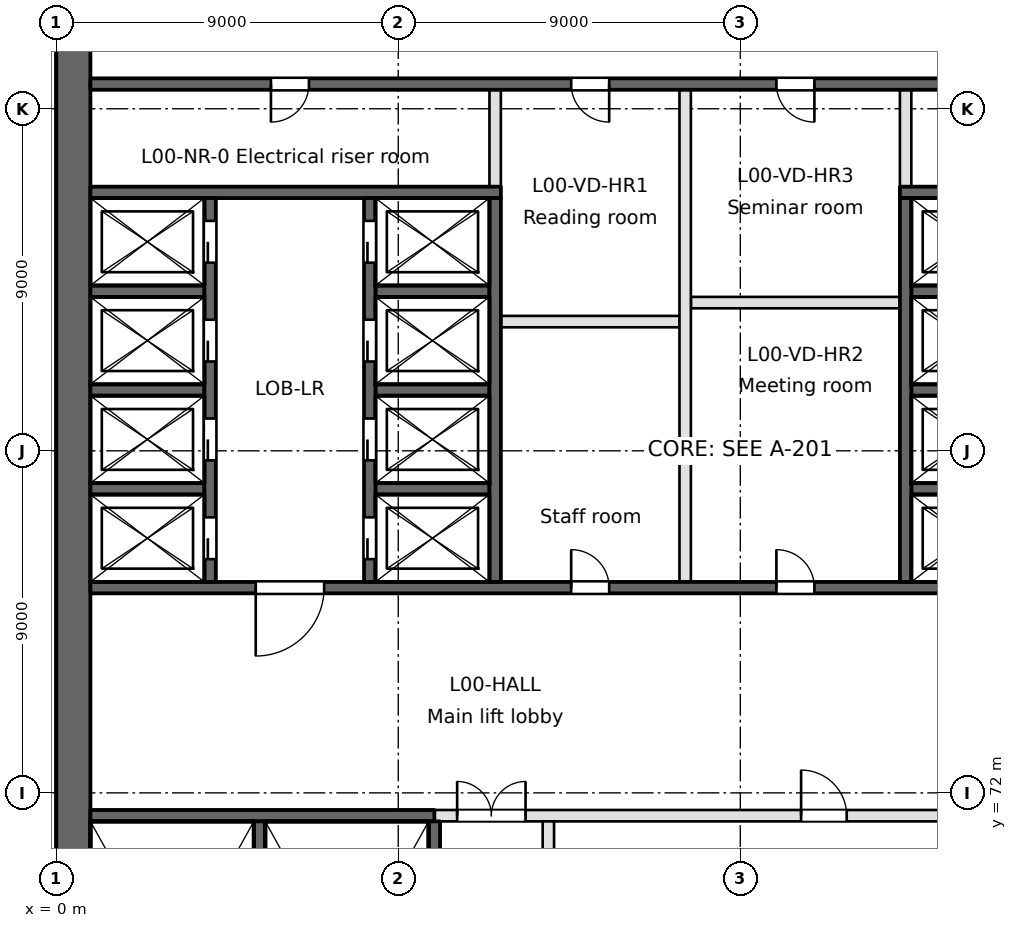
"""IFC4 building model, lengths in metres.
Left out: names, types, materials, properties, quantities, classifications, styles, units other than length and angle.
Written with IfcOpenShell. Run it as: python <this file> out.ifc"""

import sys

from ifc_helpers import new_model, si_unit, direction, frame, frame_2d, origin, place, context, subcontext, project, spatial, rectangle, extrude, element, fill, save


model = new_model("IFC4")
c1 = context("Model", 3, precision=1e-05, world=origin(), true_north=direction((0.0, 1.0)))
c2 = subcontext(c1, "Body", "Model", "MODEL_VIEW")
j1 = project(units=[si_unit("LENGTHUNIT", "METRE"), si_unit("PLANEANGLEUNIT", "RADIAN")], contexts=[c1])
p1 = place(None, origin())
s1 = spatial("IfcSite", under=j1, at=p1, CompositionType="ELEMENT")
p2 = place(p1, origin())
s2 = spatial("IfcBuilding", under=s1, at=p2, CompositionType="ELEMENT")
p3 = place(p2, origin())
s3 = spatial("IfcBuildingStorey", under=s2, at=p3, CompositionType="ELEMENT", Elevation=0.0)
p4 = place(p3, frame((0.45, 94.5, 0.0), z_axis=(0.0, 0.0, 1.0), x_axis=(0.0, -1.0, 0.0)))
e1 = element("IfcWall", 1, at=p4, inside=s3, PredefinedType="SHEAR", context=c2, shape_type="SweptSolid", body=[
    extrude(rectangle(XDim=66.085, YDim=0.9, at=frame_2d((33.042, 0.0))), origin(), (0.0, 0.0, 1.0), 6.0),
])
p5 = place(p4, frame((50.025, 0.0, 0.0)))
e2 = element("IfcOpeningElement", 2, at=p5, cuts=e1, PredefinedType="OPENING", context=c2, shape_type="SweptSolid", body=[
    extrude(rectangle(XDim=1.2, YDim=2.1, at=frame_2d((0.6, 1.05))), frame((0.0, 0.45, 0.0), z_axis=(0.0, -1.0, 0.0), x_axis=(1.0, 0.0, 0.0)), (0.0, 0.0, 1.0), 0.9),
])
p6 = place(p3, frame((0.9, 71.4, -0.4), z_axis=(0.0, 0.0, 1.0), x_axis=(1.0, 0.0, 0.0)))
e3 = element("IfcWall", 3, at=p6, inside=s3, PredefinedType="SOLIDWALL", context=c2, shape_type="SweptSolid", body=[
    extrude(rectangle(XDim=9.05, YDim=0.3, at=frame_2d((4.525, 0.0))), origin(), (0.0, 0.0, 1.0), 6.05),
])
p7 = place(p3, frame((9.95, 71.4, 0.0), z_axis=(0.0, 0.0, 1.0), x_axis=(1.0, 0.0, 0.0)))
e4 = element("IfcWall", 4, at=p7, inside=s3, PredefinedType="PARTITIONING", context=c2, shape_type="SweptSolid", body=[
    extrude(rectangle(XDim=17.65, YDim=0.3, at=frame_2d((8.825, 0.0))), origin(), (0.0, 0.0, 1.0), 5.65),
])
p8 = place(p7, frame((0.6, 0.0, 0.0)))
e5 = element("IfcOpeningElement", 5, at=p8, cuts=e4, PredefinedType="OPENING", context=c2, shape_type="SweptSolid", body=[
    extrude(rectangle(XDim=1.8, YDim=2.1, at=frame_2d((0.9, 1.05))), frame((0.0, 0.15, 0.0), z_axis=(0.0, -1.0, 0.0), x_axis=(1.0, 0.0, 0.0)), (0.0, 0.0, 1.0), 0.3),
])
p9 = place(p7, frame((9.65, 0.0, 0.0)))
e6 = element("IfcOpeningElement", 6, at=p9, cuts=e4, PredefinedType="OPENING", context=c2, shape_type="SweptSolid", body=[
    extrude(rectangle(XDim=1.2, YDim=2.1, at=frame_2d((0.6, 1.05))), frame((0.0, 0.15, 0.0), z_axis=(0.0, -1.0, 0.0), x_axis=(1.0, 0.0, 0.0)), (0.0, 0.0, 1.0), 0.3),
])
p10 = place(p3, frame((0.9, 77.4, -0.4), z_axis=(0.0, 0.0, 1.0), x_axis=(1.0, 0.0, 0.0)))
e7 = element("IfcWall", 7, at=p10, inside=s3, PredefinedType="SOLIDWALL", context=c2, shape_type="SweptSolid", body=[
    extrude(rectangle(XDim=28.95, YDim=0.3, at=frame_2d((14.475, 0.0))), origin(), (0.0, 0.0, 1.0), 6.05),
])
p11 = place(p10, frame((4.35, 0.0, 0.4)))
e8 = element("IfcOpeningElement", 8, at=p11, cuts=e7, PredefinedType="OPENING", context=c2, shape_type="SweptSolid", body=[
    extrude(rectangle(XDim=1.8, YDim=2.1, at=frame_2d((0.9, 1.05))), frame((0.0, 0.15, 0.0), z_axis=(0.0, -1.0, 0.0), x_axis=(1.0, 0.0, 0.0)), (0.0, 0.0, 1.0), 0.3),
])
p12 = place(p10, frame((25.95, 0.0, 0.4)))
e9 = element("IfcOpeningElement", 9, at=p12, cuts=e7, PredefinedType="OPENING", context=c2, shape_type="SweptSolid", body=[
    extrude(rectangle(XDim=1.8, YDim=2.1, at=frame_2d((0.9, 1.05))), frame((0.0, 0.15, 0.0), z_axis=(0.0, -1.0, 0.0), x_axis=(1.0, 0.0, 0.0)), (0.0, 0.0, 1.0), 0.3),
])
p13 = place(p10, frame((12.65, 0.0, 0.4)))
e10 = element("IfcOpeningElement", 10, at=p13, cuts=e7, PredefinedType="OPENING", context=c2, shape_type="SweptSolid", body=[
    extrude(rectangle(XDim=1.0, YDim=2.1, at=frame_2d((0.5, 1.05))), frame((0.0, 0.15, 0.0), z_axis=(0.0, -1.0, 0.0), x_axis=(1.0, 0.0, 0.0)), (0.0, 0.0, 1.0), 0.3),
])
p14 = place(p10, frame((18.05, 0.0, 0.4)))
e11 = element("IfcOpeningElement", 11, at=p14, cuts=e7, PredefinedType="OPENING", context=c2, shape_type="SweptSolid", body=[
    extrude(rectangle(XDim=1.0, YDim=2.1, at=frame_2d((0.5, 1.05))), frame((0.0, 0.15, 0.0), z_axis=(0.0, -1.0, 0.0), x_axis=(1.0, 0.0, 0.0)), (0.0, 0.0, 1.0), 0.3),
])
for number, where, z_axis, x_axis in (
    (12, (0.9, 80.0, -0.4), (0.0, 0.0, 1.0), (1.0, 0.0, 0.0)),
    (13, (8.4, 80.0, -0.4), (0.0, 0.0, 1.0), (1.0, 0.0, 0.0)),
    (14, (22.5, 80.0, -0.4), (0.0, 0.0, 1.0), (1.0, 0.0, 0.0)),
    (15, (0.9, 82.6, -0.4), (0.0, 0.0, 1.0), (1.0, 0.0, 0.0)),
    (16, (8.4, 82.6, -0.4), (0.0, 0.0, 1.0), (1.0, 0.0, 0.0)),
    (17, (22.5, 82.6, -0.4), (0.0, 0.0, 1.0), (1.0, 0.0, 0.0)),
):
    element("IfcWall", number, at=place(p3, frame(where, z_axis=z_axis, x_axis=x_axis)), inside=s3, PredefinedType="SOLIDWALL", context=c2, shape_type="SweptSolid", body=[
        extrude(rectangle(XDim=3.0, YDim=0.3, at=frame_2d((1.5, 0.0))), origin(), (0.0, 0.0, 1.0), 6.05),
    ])
p15 = place(p3, frame((11.7, 84.4, 0.0), z_axis=(0.0, 0.0, 1.0), x_axis=(1.0, 0.0, 0.0)))
e18 = element("IfcWall", 18, at=p15, inside=s3, PredefinedType="PARTITIONING", context=c2, shape_type="SweptSolid", body=[
    extrude(rectangle(XDim=4.7, YDim=0.3, at=frame_2d((2.35, 0.0))), origin(), (0.0, 0.0, 1.0), 5.65),
])
p16 = place(p3, frame((16.7, 84.9, 0.0), z_axis=(0.0, 0.0, 1.0), x_axis=(1.0, 0.0, 0.0)))
e19 = element("IfcWall", 19, at=p16, inside=s3, PredefinedType="PARTITIONING", context=c2, shape_type="SweptSolid", body=[
    extrude(rectangle(XDim=5.5, YDim=0.3, at=frame_2d((2.75, 0.0))), origin(), (0.0, 0.0, 1.0), 5.65),
])
for number, where, z_axis, x_axis in (
    (20, (0.9, 85.2, -0.4), (0.0, 0.0, 1.0), (1.0, 0.0, 0.0)),
    (21, (8.4, 85.2, -0.4), (0.0, 0.0, 1.0), (1.0, 0.0, 0.0)),
    (22, (22.5, 85.2, -0.4), (0.0, 0.0, 1.0), (1.0, 0.0, 0.0)),
):
    element("IfcWall", number, at=place(p3, frame(where, z_axis=z_axis, x_axis=x_axis)), inside=s3, PredefinedType="SOLIDWALL", context=c2, shape_type="SweptSolid", body=[
        extrude(rectangle(XDim=3.0, YDim=0.3, at=frame_2d((1.5, 0.0))), origin(), (0.0, 0.0, 1.0), 6.05),
    ])
p17 = place(p3, frame((0.9, 87.8, -0.4), z_axis=(0.0, 0.0, 1.0), x_axis=(1.0, 0.0, 0.0)))
e23 = element("IfcWall", 23, at=p17, inside=s3, PredefinedType="SOLIDWALL", context=c2, shape_type="SweptSolid", body=[
    extrude(rectangle(XDim=10.8, YDim=0.3, at=frame_2d((5.4, 0.0))), origin(), (0.0, 0.0, 1.0), 6.05),
])
p18 = place(p3, frame((22.2, 87.8, -0.4), z_axis=(0.0, 0.0, 1.0), x_axis=(1.0, 0.0, 0.0)))
e24 = element("IfcWall", 24, at=p18, inside=s3, PredefinedType="SOLIDWALL", context=c2, shape_type="SweptSolid", body=[
    extrude(rectangle(XDim=7.8, YDim=0.3, at=frame_2d((3.9, 0.0))), origin(), (0.0, 0.0, 1.0), 6.05),
])
p19 = place(p3, frame((0.9, 90.65, -0.4), z_axis=(0.0, 0.0, 1.0), x_axis=(1.0, 0.0, 0.0)))
e25 = element("IfcWall", 25, at=p19, inside=s3, PredefinedType="SOLIDWALL", context=c2, shape_type="SweptSolid", body=[
    extrude(rectangle(XDim=34.6, YDim=0.3, at=frame_2d((17.3, 0.0))), origin(), (0.0, 0.0, 1.0), 6.05),
])
p20 = place(p19, frame((4.75, 0.0, 0.4)))
e26 = element("IfcOpeningElement", 26, at=p20, cuts=e25, PredefinedType="OPENING", context=c2, shape_type="SweptSolid", body=[
    extrude(rectangle(XDim=1.0, YDim=2.1, at=frame_2d((0.5, 1.05))), frame((0.0, 0.15, 0.0), z_axis=(0.0, -1.0, 0.0), x_axis=(1.0, 0.0, 0.0)), (0.0, 0.0, 1.0), 0.3),
])
p21 = place(p19, frame((24.7, 0.0, 0.4)))
e27 = element("IfcOpeningElement", 27, at=p21, cuts=e25, PredefinedType="OPENING", context=c2, shape_type="SweptSolid", body=[
    extrude(rectangle(XDim=1.0, YDim=2.1, at=frame_2d((0.5, 1.05))), frame((0.0, 0.15, 0.0), z_axis=(0.0, -1.0, 0.0), x_axis=(1.0, 0.0, 0.0)), (0.0, 0.0, 1.0), 0.3),
])
p22 = place(p19, frame((12.65, 0.0, 0.4)))
e28 = element("IfcOpeningElement", 28, at=p22, cuts=e25, PredefinedType="OPENING", context=c2, shape_type="SweptSolid", body=[
    extrude(rectangle(XDim=1.0, YDim=2.1, at=frame_2d((0.5, 1.05))), frame((0.0, 0.15, 0.0), z_axis=(0.0, -1.0, 0.0), x_axis=(1.0, 0.0, 0.0)), (0.0, 0.0, 1.0), 0.3),
])
p23 = place(p19, frame((18.05, 0.0, 0.4)))
e29 = element("IfcOpeningElement", 29, at=p23, cuts=e25, PredefinedType="OPENING", context=c2, shape_type="SweptSolid", body=[
    extrude(rectangle(XDim=1.0, YDim=2.1, at=frame_2d((0.5, 1.05))), frame((0.0, 0.15, 0.0), z_axis=(0.0, -1.0, 0.0), x_axis=(1.0, 0.0, 0.0)), (0.0, 0.0, 1.0), 0.3),
])
p24 = place(p19, frame((31.4, 0.0, 0.4)))
e30 = element("IfcOpeningElement", 30, at=p24, cuts=e25, PredefinedType="OPENING", context=c2, shape_type="SweptSolid", body=[
    extrude(rectangle(XDim=1.0, YDim=2.1, at=frame_2d((0.5, 1.05))), frame((0.0, 0.15, 0.0), z_axis=(0.0, -1.0, 0.0), x_axis=(1.0, 0.0, 0.0)), (0.0, 0.0, 1.0), 0.3),
])
p25 = place(p3, frame((4.05, 77.55, -0.4), z_axis=(0.0, 0.0, 1.0), x_axis=(0.0, 1.0, 0.0)))
e31 = element("IfcWall", 31, at=p25, inside=s3, PredefinedType="SOLIDWALL", context=c2, shape_type="SweptSolid", body=[
    extrude(rectangle(XDim=10.1, YDim=0.3, at=frame_2d((5.05, 0.0))), origin(), (0.0, 0.0, 1.0), 6.05),
])
p26 = place(p25, frame((0.6, 0.0, 0.4)))
e32 = element("IfcOpeningElement", 32, at=p26, cuts=e31, PredefinedType="OPENING", context=c2, shape_type="SweptSolid", body=[
    extrude(rectangle(XDim=1.1, YDim=2.1, at=frame_2d((0.55, 1.05))), frame((0.0, 0.15, 0.0), z_axis=(0.0, -1.0, 0.0), x_axis=(1.0, 0.0, 0.0)), (0.0, 0.0, 1.0), 0.3),
])
p27 = place(p25, frame((3.2, 0.0, 0.4)))
e33 = element("IfcOpeningElement", 33, at=p27, cuts=e31, PredefinedType="OPENING", context=c2, shape_type="SweptSolid", body=[
    extrude(rectangle(XDim=1.1, YDim=2.1, at=frame_2d((0.55, 1.05))), frame((0.0, 0.15, 0.0), z_axis=(0.0, -1.0, 0.0), x_axis=(1.0, 0.0, 0.0)), (0.0, 0.0, 1.0), 0.3),
])
p28 = place(p25, frame((5.8, 0.0, 0.4)))
e34 = element("IfcOpeningElement", 34, at=p28, cuts=e31, PredefinedType="OPENING", context=c2, shape_type="SweptSolid", body=[
    extrude(rectangle(XDim=1.1, YDim=2.1, at=frame_2d((0.55, 1.05))), frame((0.0, 0.15, 0.0), z_axis=(0.0, -1.0, 0.0), x_axis=(1.0, 0.0, 0.0)), (0.0, 0.0, 1.0), 0.3),
])
p29 = place(p25, frame((8.4, 0.0, 0.4)))
e35 = element("IfcOpeningElement", 35, at=p29, cuts=e31, PredefinedType="OPENING", context=c2, shape_type="SweptSolid", body=[
    extrude(rectangle(XDim=1.1, YDim=2.1, at=frame_2d((0.55, 1.05))), frame((0.0, 0.15, 0.0), z_axis=(0.0, -1.0, 0.0), x_axis=(1.0, 0.0, 0.0)), (0.0, 0.0, 1.0), 0.3),
])
p30 = place(p3, frame((5.35, 63.5, -0.4), z_axis=(0.0, 0.0, 1.0), x_axis=(0.0, 1.0, 0.0)))
e36 = element("IfcWall", 36, at=p30, inside=s3, PredefinedType="SOLIDWALL", context=c2, shape_type="SweptSolid", body=[
    extrude(rectangle(XDim=7.75, YDim=0.3, at=frame_2d((3.875, 0.0))), origin(), (0.0, 0.0, 1.0), 6.05),
])
p31 = place(p3, frame((8.25, 77.55, -0.4), z_axis=(0.0, 0.0, 1.0), x_axis=(0.0, 1.0, 0.0)))
e37 = element("IfcWall", 37, at=p31, inside=s3, PredefinedType="SOLIDWALL", context=c2, shape_type="SweptSolid", body=[
    extrude(rectangle(XDim=10.1, YDim=0.3, at=frame_2d((5.05, 0.0))), origin(), (0.0, 0.0, 1.0), 6.05),
])
p32 = place(p31, frame((0.6, 0.0, 0.4)))
e38 = element("IfcOpeningElement", 38, at=p32, cuts=e37, PredefinedType="OPENING", context=c2, shape_type="SweptSolid", body=[
    extrude(rectangle(XDim=1.1, YDim=2.1, at=frame_2d((0.55, 1.05))), frame((0.0, 0.15, 0.0), z_axis=(0.0, -1.0, 0.0), x_axis=(1.0, 0.0, 0.0)), (0.0, 0.0, 1.0), 0.3),
])
p33 = place(p31, frame((3.2, 0.0, 0.4)))
e39 = element("IfcOpeningElement", 39, at=p33, cuts=e37, PredefinedType="OPENING", context=c2, shape_type="SweptSolid", body=[
    extrude(rectangle(XDim=1.1, YDim=2.1, at=frame_2d((0.55, 1.05))), frame((0.0, 0.15, 0.0), z_axis=(0.0, -1.0, 0.0), x_axis=(1.0, 0.0, 0.0)), (0.0, 0.0, 1.0), 0.3),
])
p34 = place(p31, frame((5.8, 0.0, 0.4)))
e40 = element("IfcOpeningElement", 40, at=p34, cuts=e37, PredefinedType="OPENING", context=c2, shape_type="SweptSolid", body=[
    extrude(rectangle(XDim=1.1, YDim=2.1, at=frame_2d((0.55, 1.05))), frame((0.0, 0.15, 0.0), z_axis=(0.0, -1.0, 0.0), x_axis=(1.0, 0.0, 0.0)), (0.0, 0.0, 1.0), 0.3),
])
p35 = place(p31, frame((8.4, 0.0, 0.4)))
e41 = element("IfcOpeningElement", 41, at=p35, cuts=e37, PredefinedType="OPENING", context=c2, shape_type="SweptSolid", body=[
    extrude(rectangle(XDim=1.1, YDim=2.1, at=frame_2d((0.55, 1.05))), frame((0.0, 0.15, 0.0), z_axis=(0.0, -1.0, 0.0), x_axis=(1.0, 0.0, 0.0)), (0.0, 0.0, 1.0), 0.3),
])
p36 = place(p3, frame((9.95, 63.5, -0.4), z_axis=(0.0, 0.0, 1.0), x_axis=(0.0, 1.0, 0.0)))
e42 = element("IfcWall", 42, at=p36, inside=s3, PredefinedType="SOLIDWALL", context=c2, shape_type="SweptSolid", body=[
    extrude(rectangle(XDim=7.75, YDim=0.3, at=frame_2d((3.875, 0.0))), origin(), (0.0, 0.0, 1.0), 6.05),
])
p37 = place(p3, frame((11.55, 77.55, -0.4), z_axis=(0.0, 0.0, 1.0), x_axis=(0.0, 1.0, 0.0)))
e43 = element("IfcWall", 43, at=p37, inside=s3, PredefinedType="SOLIDWALL", context=c2, shape_type="SweptSolid", body=[
    extrude(rectangle(XDim=10.1, YDim=0.3, at=frame_2d((5.05, 0.0))), origin(), (0.0, 0.0, 1.0), 6.05),
])
p38 = place(p3, frame((11.55, 87.95, 0.0), z_axis=(0.0, 0.0, 1.0), x_axis=(0.0, 1.0, 0.0)))
e44 = element("IfcWall", 44, at=p38, inside=s3, PredefinedType="PARTITIONING", context=c2, shape_type="SweptSolid", body=[
    extrude(rectangle(XDim=2.55, YDim=0.3, at=frame_2d((1.275, 0.0))), origin(), (0.0, 0.0, 1.0), 5.65),
])
p39 = place(p3, frame((12.95, 63.5, 0.0), z_axis=(0.0, 0.0, 1.0), x_axis=(0.0, 1.0, 0.0)))
e45 = element("IfcWall", 45, at=p39, inside=s3, PredefinedType="PARTITIONING", context=c2, shape_type="SweptSolid", body=[
    extrude(rectangle(XDim=7.75, YDim=0.3, at=frame_2d((3.875, 0.0))), origin(), (0.0, 0.0, 1.0), 5.65),
])
p40 = place(p3, frame((16.55, 77.55, 0.0), z_axis=(0.0, 0.0, 1.0), x_axis=(0.0, 1.0, 0.0)))
e46 = element("IfcWall", 46, at=p40, inside=s3, PredefinedType="PARTITIONING", context=c2, shape_type="SweptSolid", body=[
    extrude(rectangle(XDim=12.95, YDim=0.3, at=frame_2d((6.475, 0.0))), origin(), (0.0, 0.0, 1.0), 5.65),
])
p41 = place(p3, frame((22.35, 77.55, -0.4), z_axis=(0.0, 0.0, 1.0), x_axis=(0.0, 1.0, 0.0)))
e47 = element("IfcWall", 47, at=p41, inside=s3, PredefinedType="SOLIDWALL", context=c2, shape_type="SweptSolid", body=[
    extrude(rectangle(XDim=10.1, YDim=0.3, at=frame_2d((5.05, 0.0))), origin(), (0.0, 0.0, 1.0), 6.05),
])
p42 = place(p3, frame((22.35, 87.95, 0.0), z_axis=(0.0, 0.0, 1.0), x_axis=(0.0, 1.0, 0.0)))
e48 = element("IfcWall", 48, at=p42, inside=s3, PredefinedType="PARTITIONING", context=c2, shape_type="SweptSolid", body=[
    extrude(rectangle(XDim=2.55, YDim=0.3, at=frame_2d((1.275, 0.0))), origin(), (0.0, 0.0, 1.0), 5.65),
])
p43 = place(p26, origin())
e49 = element("IfcDoor", 49, at=p43, inside=s3, OperationType="SLIDING_TO_RIGHT", PredefinedType="DOOR", context=c2, shape_type="SweptSolid", body=[
    extrude(rectangle(XDim=1.1, YDim=2.1, at=frame_2d((0.55, 1.05))), frame((0.0, 0.025, 0.0), z_axis=(0.0, -1.0, 0.0), x_axis=(1.0, 0.0, 0.0)), (0.0, 0.0, 1.0), 0.05),
])
fill(e32, e49)
p44 = place(p27, origin())
e50 = element("IfcDoor", 50, at=p44, inside=s3, OperationType="SLIDING_TO_LEFT", PredefinedType="DOOR", context=c2, shape_type="SweptSolid", body=[
    extrude(rectangle(XDim=1.1, YDim=2.1, at=frame_2d((0.55, 1.05))), frame((0.0, 0.025, 0.0), z_axis=(0.0, -1.0, 0.0), x_axis=(1.0, 0.0, 0.0)), (0.0, 0.0, 1.0), 0.05),
])
fill(e33, e50)
p45 = place(p28, origin())
e51 = element("IfcDoor", 51, at=p45, inside=s3, OperationType="SLIDING_TO_RIGHT", PredefinedType="DOOR", context=c2, shape_type="SweptSolid", body=[
    extrude(rectangle(XDim=1.1, YDim=2.1, at=frame_2d((0.55, 1.05))), frame((0.0, 0.025, 0.0), z_axis=(0.0, -1.0, 0.0), x_axis=(1.0, 0.0, 0.0)), (0.0, 0.0, 1.0), 0.05),
])
fill(e34, e51)
p46 = place(p29, origin())
e52 = element("IfcDoor", 52, at=p46, inside=s3, OperationType="SLIDING_TO_LEFT", PredefinedType="DOOR", context=c2, shape_type="SweptSolid", body=[
    extrude(rectangle(XDim=1.1, YDim=2.1, at=frame_2d((0.55, 1.05))), frame((0.0, 0.025, 0.0), z_axis=(0.0, -1.0, 0.0), x_axis=(1.0, 0.0, 0.0)), (0.0, 0.0, 1.0), 0.05),
])
fill(e35, e52)
p47 = place(p32, origin())
e53 = element("IfcDoor", 53, at=p47, inside=s3, OperationType="SLIDING_TO_RIGHT", PredefinedType="DOOR", context=c2, shape_type="SweptSolid", body=[
    extrude(rectangle(XDim=1.1, YDim=2.1, at=frame_2d((0.55, 1.05))), frame((0.0, 0.025, 0.0), z_axis=(0.0, -1.0, 0.0), x_axis=(1.0, 0.0, 0.0)), (0.0, 0.0, 1.0), 0.05),
])
fill(e38, e53)
p48 = place(p33, origin())
e54 = element("IfcDoor", 54, at=p48, inside=s3, OperationType="SLIDING_TO_LEFT", PredefinedType="DOOR", context=c2, shape_type="SweptSolid", body=[
    extrude(rectangle(XDim=1.1, YDim=2.1, at=frame_2d((0.55, 1.05))), frame((0.0, 0.025, 0.0), z_axis=(0.0, -1.0, 0.0), x_axis=(1.0, 0.0, 0.0)), (0.0, 0.0, 1.0), 0.05),
])
fill(e39, e54)
p49 = place(p34, origin())
e55 = element("IfcDoor", 55, at=p49, inside=s3, OperationType="SLIDING_TO_RIGHT", PredefinedType="DOOR", context=c2, shape_type="SweptSolid", body=[
    extrude(rectangle(XDim=1.1, YDim=2.1, at=frame_2d((0.55, 1.05))), frame((0.0, 0.025, 0.0), z_axis=(0.0, -1.0, 0.0), x_axis=(1.0, 0.0, 0.0)), (0.0, 0.0, 1.0), 0.05),
])
fill(e40, e55)
p50 = place(p35, origin())
e56 = element("IfcDoor", 56, at=p50, inside=s3, OperationType="SLIDING_TO_LEFT", PredefinedType="DOOR", context=c2, shape_type="SweptSolid", body=[
    extrude(rectangle(XDim=1.1, YDim=2.1, at=frame_2d((0.55, 1.05))), frame((0.0, 0.025, 0.0), z_axis=(0.0, -1.0, 0.0), x_axis=(1.0, 0.0, 0.0)), (0.0, 0.0, 1.0), 0.05),
])
fill(e41, e56)
p51 = place(p11, frame((1.8, 0.0, 0.0), z_axis=(0.0, 0.0, 1.0), x_axis=(-1.0, 0.0, 0.0)))
e57 = element("IfcDoor", 57, at=p51, inside=s3, OperationType="SINGLE_SWING_RIGHT", PredefinedType="DOOR", context=c2, shape_type="SweptSolid", body=[
    extrude(rectangle(XDim=1.8, YDim=2.1, at=frame_2d((0.9, 1.05))), frame((0.0, 0.025, 0.0), z_axis=(0.0, -1.0, 0.0), x_axis=(1.0, 0.0, 0.0)), (0.0, 0.0, 1.0), 0.05),
])
fill(e8, e57)
p52 = place(p8, origin())
e58 = element("IfcDoor", 58, at=p52, inside=s3, OperationType="DOUBLE_DOOR_SINGLE_SWING", PredefinedType="DOOR", context=c2, shape_type="SweptSolid", body=[
    extrude(rectangle(XDim=1.8, YDim=2.1, at=frame_2d((0.9, 1.05))), frame((0.0, 0.025, 0.0), z_axis=(0.0, -1.0, 0.0), x_axis=(1.0, 0.0, 0.0)), (0.0, 0.0, 1.0), 0.05),
])
fill(e5, e58)
p53 = place(p9, origin())
e59 = element("IfcDoor", 59, at=p53, inside=s3, OperationType="SINGLE_SWING_LEFT", PredefinedType="DOOR", context=c2, shape_type="SweptSolid", body=[
    extrude(rectangle(XDim=1.2, YDim=2.1, at=frame_2d((0.6, 1.05))), frame((0.0, 0.025, 0.0), z_axis=(0.0, -1.0, 0.0), x_axis=(1.0, 0.0, 0.0)), (0.0, 0.0, 1.0), 0.05),
])
fill(e6, e59)
p54 = place(p20, frame((1.0, 0.0, 0.0), z_axis=(0.0, 0.0, 1.0), x_axis=(-1.0, 0.0, 0.0)))
e60 = element("IfcDoor", 60, at=p54, inside=s3, OperationType="SINGLE_SWING_RIGHT", PredefinedType="DOOR", context=c2, shape_type="SweptSolid", body=[
    extrude(rectangle(XDim=1.0, YDim=2.1, at=frame_2d((0.5, 1.05))), frame((0.0, 0.025, 0.0), z_axis=(0.0, -1.0, 0.0), x_axis=(1.0, 0.0, 0.0)), (0.0, 0.0, 1.0), 0.05),
])
fill(e26, e60)
p55 = place(p13, origin())
e61 = element("IfcDoor", 61, at=p55, inside=s3, OperationType="SINGLE_SWING_LEFT", PredefinedType="DOOR", context=c2, shape_type="SweptSolid", body=[
    extrude(rectangle(XDim=1.0, YDim=2.1, at=frame_2d((0.5, 1.05))), frame((0.0, 0.025, 0.0), z_axis=(0.0, -1.0, 0.0), x_axis=(1.0, 0.0, 0.0)), (0.0, 0.0, 1.0), 0.05),
])
fill(e10, e61)
p56 = place(p22, frame((1.0, 0.0, 0.0), z_axis=(0.0, 0.0, 1.0), x_axis=(-1.0, 0.0, 0.0)))
e62 = element("IfcDoor", 62, at=p56, inside=s3, OperationType="SINGLE_SWING_LEFT", PredefinedType="DOOR", context=c2, shape_type="SweptSolid", body=[
    extrude(rectangle(XDim=1.0, YDim=2.1, at=frame_2d((0.5, 1.05))), frame((0.0, 0.025, 0.0), z_axis=(0.0, -1.0, 0.0), x_axis=(1.0, 0.0, 0.0)), (0.0, 0.0, 1.0), 0.05),
])
fill(e28, e62)
p57 = place(p14, origin())
e63 = element("IfcDoor", 63, at=p57, inside=s3, OperationType="SINGLE_SWING_LEFT", PredefinedType="DOOR", context=c2, shape_type="SweptSolid", body=[
    extrude(rectangle(XDim=1.0, YDim=2.1, at=frame_2d((0.5, 1.05))), frame((0.0, 0.025, 0.0), z_axis=(0.0, -1.0, 0.0), x_axis=(1.0, 0.0, 0.0)), (0.0, 0.0, 1.0), 0.05),
])
fill(e11, e63)
p58 = place(p23, frame((1.0, 0.0, 0.0), z_axis=(0.0, 0.0, 1.0), x_axis=(-1.0, 0.0, 0.0)))
e64 = element("IfcDoor", 64, at=p58, inside=s3, OperationType="SINGLE_SWING_LEFT", PredefinedType="DOOR", context=c2, shape_type="SweptSolid", body=[
    extrude(rectangle(XDim=1.0, YDim=2.1, at=frame_2d((0.5, 1.05))), frame((0.0, 0.025, 0.0), z_axis=(0.0, -1.0, 0.0), x_axis=(1.0, 0.0, 0.0)), (0.0, 0.0, 1.0), 0.05),
])
fill(e29, e64)
save(model, sys.argv[1])
